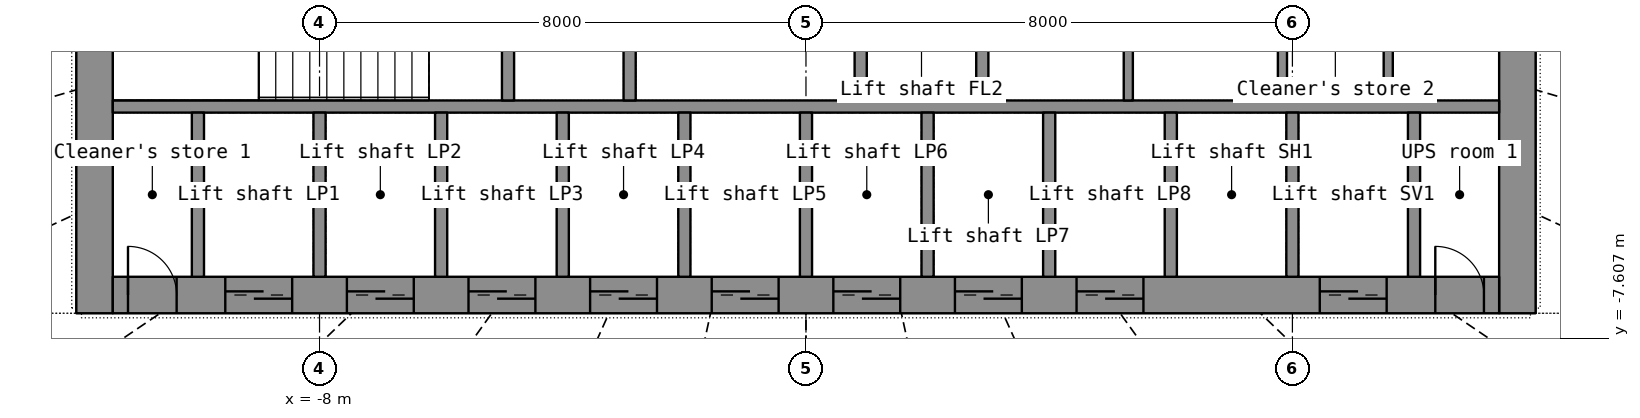
"""IFC4 building model, lengths in metres.
Left out: names, types, materials, properties, quantities, classifications, styles, units other than length and angle.
Written with IfcOpenShell. Run it as: python <this file> out.ifc"""

import sys

from ifc_helpers import new_model, si_unit, direction, frame, frame_2d, origin, place, context, subcontext, project, spatial, rectangle, extrude, element, fill, save


model = new_model("IFC4")
c1 = context("Model", 3, precision=1e-05, world=origin(), true_north=direction((0.0, 1.0)))
c2 = subcontext(c1, "Body", "Model", "MODEL_VIEW")
j1 = project(units=[si_unit("LENGTHUNIT", "METRE"), si_unit("PLANEANGLEUNIT", "RADIAN")], contexts=[c1])
p1 = place(None, origin())
s1 = spatial("IfcSite", under=j1, at=p1, CompositionType="ELEMENT")
p2 = place(p1, origin())
s2 = spatial("IfcBuilding", under=s1, at=p2, CompositionType="ELEMENT")
p3 = place(p2, frame((0.0, 0.0, 77.8)))
s3 = spatial("IfcBuildingStorey", under=s2, at=p3, CompositionType="ELEMENT", Elevation=77.8)
p4 = place(p3, frame((-11.7, -7.2, 0.0), z_axis=(0.0, 0.0, 1.0), x_axis=(0.0, 1.0, 0.0)))
e1 = element("IfcWall", 1, at=p4, inside=s3, PredefinedType="SHEAR", context=c2, shape_type="SweptSolid", body=[
    extrude(rectangle(XDim=14.4, YDim=0.6, at=frame_2d((7.2, 0.0))), origin(), (0.0, 0.0, 1.0), 3.3),
])
p5 = place(p4, frame((6.5, 0.0, 0.0)))
e2 = element("IfcOpeningElement", 2, at=p5, cuts=e1, PredefinedType="OPENING", context=c2, shape_type="SweptSolid", body=[
    extrude(rectangle(XDim=1.4, YDim=2.2, at=frame_2d((0.7, 1.1))), frame((0.0, 0.31, 0.0), z_axis=(0.0, -1.0, 0.0), x_axis=(1.0, 0.0, 0.0)), (0.0, 0.0, 1.0), 0.62),
])
p6 = place(p3, frame((11.7, -7.2, 0.0), z_axis=(0.0, 0.0, 1.0), x_axis=(0.0, 1.0, 0.0)))
e3 = element("IfcWall", 3, at=p6, inside=s3, PredefinedType="SHEAR", context=c2, shape_type="SweptSolid", body=[
    extrude(rectangle(XDim=14.4, YDim=0.6, at=frame_2d((7.2, 0.0))), origin(), (0.0, 0.0, 1.0), 3.3),
])
p7 = place(p6, frame((6.5, 0.0, 0.0)))
e4 = element("IfcOpeningElement", 4, at=p7, cuts=e3, PredefinedType="OPENING", context=c2, shape_type="SweptSolid", body=[
    extrude(rectangle(XDim=1.4, YDim=2.2, at=frame_2d((0.7, 1.1))), frame((0.0, 0.31, 0.0), z_axis=(0.0, -1.0, 0.0), x_axis=(1.0, 0.0, 0.0)), (0.0, 0.0, 1.0), 0.62),
])
p8 = place(p3, frame((-11.4, -6.9, 0.0), z_axis=(0.0, 0.0, 1.0), x_axis=(1.0, 0.0, 0.0)))
e5 = element("IfcWall", 5, at=p8, inside=s3, PredefinedType="SHEAR", context=c2, shape_type="SweptSolid", body=[
    extrude(rectangle(XDim=22.8, YDim=0.6, at=frame_2d((11.4, 0.0))), origin(), (0.0, 0.0, 1.0), 3.3),
])
p9 = place(p8, frame((1.85, 0.0, 0.0)))
e6 = element("IfcOpeningElement", 6, at=p9, cuts=e5, PredefinedType="OPENING", context=c2, shape_type="SweptSolid", body=[
    extrude(rectangle(XDim=1.1, YDim=2.2, at=frame_2d((0.55, 1.1))), frame((0.0, 0.31, 0.0), z_axis=(0.0, -1.0, 0.0), x_axis=(1.0, 0.0, 0.0)), (0.0, 0.0, 1.0), 0.62),
])
p10 = place(p8, frame((3.85, 0.0, 0.0)))
e7 = element("IfcOpeningElement", 7, at=p10, cuts=e5, PredefinedType="OPENING", context=c2, shape_type="SweptSolid", body=[
    extrude(rectangle(XDim=1.1, YDim=2.2, at=frame_2d((0.55, 1.1))), frame((0.0, 0.31, 0.0), z_axis=(0.0, -1.0, 0.0), x_axis=(1.0, 0.0, 0.0)), (0.0, 0.0, 1.0), 0.62),
])
p11 = place(p8, frame((5.85, 0.0, 0.0)))
e8 = element("IfcOpeningElement", 8, at=p11, cuts=e5, PredefinedType="OPENING", context=c2, shape_type="SweptSolid", body=[
    extrude(rectangle(XDim=1.1, YDim=2.2, at=frame_2d((0.55, 1.1))), frame((0.0, 0.31, 0.0), z_axis=(0.0, -1.0, 0.0), x_axis=(1.0, 0.0, 0.0)), (0.0, 0.0, 1.0), 0.62),
])
p12 = place(p8, frame((7.85, 0.0, 0.0)))
e9 = element("IfcOpeningElement", 9, at=p12, cuts=e5, PredefinedType="OPENING", context=c2, shape_type="SweptSolid", body=[
    extrude(rectangle(XDim=1.1, YDim=2.2, at=frame_2d((0.55, 1.1))), frame((0.0, 0.31, 0.0), z_axis=(0.0, -1.0, 0.0), x_axis=(1.0, 0.0, 0.0)), (0.0, 0.0, 1.0), 0.62),
])
p13 = place(p8, frame((9.85, 0.0, 0.0)))
e10 = element("IfcOpeningElement", 10, at=p13, cuts=e5, PredefinedType="OPENING", context=c2, shape_type="SweptSolid", body=[
    extrude(rectangle(XDim=1.1, YDim=2.2, at=frame_2d((0.55, 1.1))), frame((0.0, 0.31, 0.0), z_axis=(0.0, -1.0, 0.0), x_axis=(1.0, 0.0, 0.0)), (0.0, 0.0, 1.0), 0.62),
])
p14 = place(p8, frame((11.85, 0.0, 0.0)))
e11 = element("IfcOpeningElement", 11, at=p14, cuts=e5, PredefinedType="OPENING", context=c2, shape_type="SweptSolid", body=[
    extrude(rectangle(XDim=1.1, YDim=2.2, at=frame_2d((0.55, 1.1))), frame((0.0, 0.31, 0.0), z_axis=(0.0, -1.0, 0.0), x_axis=(1.0, 0.0, 0.0)), (0.0, 0.0, 1.0), 0.62),
])
p15 = place(p8, frame((13.85, 0.0, 0.0)))
e12 = element("IfcOpeningElement", 12, at=p15, cuts=e5, PredefinedType="OPENING", context=c2, shape_type="SweptSolid", body=[
    extrude(rectangle(XDim=1.1, YDim=2.2, at=frame_2d((0.55, 1.1))), frame((0.0, 0.31, 0.0), z_axis=(0.0, -1.0, 0.0), x_axis=(1.0, 0.0, 0.0)), (0.0, 0.0, 1.0), 0.62),
])
p16 = place(p8, frame((15.85, 0.0, 0.0)))
e13 = element("IfcOpeningElement", 13, at=p16, cuts=e5, PredefinedType="OPENING", context=c2, shape_type="SweptSolid", body=[
    extrude(rectangle(XDim=1.1, YDim=2.2, at=frame_2d((0.55, 1.1))), frame((0.0, 0.31, 0.0), z_axis=(0.0, -1.0, 0.0), x_axis=(1.0, 0.0, 0.0)), (0.0, 0.0, 1.0), 0.62),
])
p17 = place(p8, frame((19.85, 0.0, 0.0)))
e14 = element("IfcOpeningElement", 14, at=p17, cuts=e5, PredefinedType="OPENING", context=c2, shape_type="SweptSolid", body=[
    extrude(rectangle(XDim=1.1, YDim=2.2, at=frame_2d((0.55, 1.1))), frame((0.0, 0.31, 0.0), z_axis=(0.0, -1.0, 0.0), x_axis=(1.0, 0.0, 0.0)), (0.0, 0.0, 1.0), 0.62),
])
p18 = place(p8, frame((0.25, 0.0, 0.0)))
e15 = element("IfcOpeningElement", 15, at=p18, cuts=e5, PredefinedType="OPENING", context=c2, shape_type="SweptSolid", body=[
    extrude(rectangle(XDim=0.8, YDim=2.05, at=frame_2d((0.4, 1.025))), frame((0.0, 0.31, 0.0), z_axis=(0.0, -1.0, 0.0), x_axis=(1.0, 0.0, 0.0)), (0.0, 0.0, 1.0), 0.62),
])
p19 = place(p8, frame((21.75, 0.0, 0.0)))
e16 = element("IfcOpeningElement", 16, at=p19, cuts=e5, PredefinedType="OPENING", context=c2, shape_type="SweptSolid", body=[
    extrude(rectangle(XDim=0.8, YDim=2.05, at=frame_2d((0.4, 1.025))), frame((0.0, 0.31, 0.0), z_axis=(0.0, -1.0, 0.0), x_axis=(1.0, 0.0, 0.0)), (0.0, 0.0, 1.0), 0.62),
])
p20 = place(p3, frame((-11.4, -3.8, 0.0), z_axis=(0.0, 0.0, 1.0), x_axis=(1.0, 0.0, 0.0)))
e17 = element("IfcWall", 17, at=p20, inside=s3, PredefinedType="SHEAR", context=c2, shape_type="SweptSolid", body=[
    extrude(rectangle(XDim=22.8, YDim=0.2, at=frame_2d((11.4, 0.0))), origin(), (0.0, 0.0, 1.0), 3.3),
])
for number, where, z_axis, x_axis in (
    (18, (-10.0, -6.6, 0.0), (0.0, 0.0, 1.0), (0.0, 1.0, 0.0)),
    (19, (-8.0, -6.6, 0.0), (0.0, 0.0, 1.0), (0.0, 1.0, 0.0)),
    (20, (-6.0, -6.6, 0.0), (0.0, 0.0, 1.0), (0.0, 1.0, 0.0)),
    (21, (-4.0, -6.6, 0.0), (0.0, 0.0, 1.0), (0.0, 1.0, 0.0)),
    (22, (-2.0, -6.6, 0.0), (0.0, 0.0, 1.0), (0.0, 1.0, 0.0)),
    (23, (0.0, -6.6, 0.0), (0.0, 0.0, 1.0), (0.0, 1.0, 0.0)),
    (24, (2.0, -6.6, 0.0), (0.0, 0.0, 1.0), (0.0, 1.0, 0.0)),
    (25, (4.0, -6.6, 0.0), (0.0, 0.0, 1.0), (0.0, 1.0, 0.0)),
    (26, (6.0, -6.6, 0.0), (0.0, 0.0, 1.0), (0.0, 1.0, 0.0)),
    (27, (8.0, -6.6, 0.0), (0.0, 0.0, 1.0), (0.0, 1.0, 0.0)),
    (28, (10.0, -6.6, 0.0), (0.0, 0.0, 1.0), (0.0, 1.0, 0.0)),
):
    element("IfcWall", number, at=place(p3, frame(where, z_axis=z_axis, x_axis=x_axis)), inside=s3, PredefinedType="SHEAR", context=c2, shape_type="SweptSolid", body=[
        extrude(rectangle(XDim=2.7, YDim=0.2, at=frame_2d((1.35, 0.0))), origin(), (0.0, 0.0, 1.0), 3.3),
    ])
p21 = place(p3, frame((-2.9, -3.7, 0.0), z_axis=(0.0, 0.0, 1.0), x_axis=(0.0, 1.0, 0.0)))
e29 = element("IfcWall", 29, at=p21, inside=s3, PredefinedType="SHEAR", context=c2, shape_type="SweptSolid", body=[
    extrude(rectangle(XDim=7.4, YDim=0.2, at=frame_2d((3.7, 0.0))), origin(), (0.0, 0.0, 1.0), 3.3),
])
p22 = place(p21, frame((3.1, 0.0, 0.0)))
e30 = element("IfcOpeningElement", 30, at=p22, cuts=e29, PredefinedType="OPENING", context=c2, shape_type="SweptSolid", body=[
    extrude(rectangle(XDim=1.2, YDim=2.2, at=frame_2d((0.6, 1.1))), frame((0.0, 0.11, 0.0), z_axis=(0.0, -1.0, 0.0), x_axis=(1.0, 0.0, 0.0)), (0.0, 0.0, 1.0), 0.22),
])
p23 = place(p3, frame((2.9, -3.7, 0.0), z_axis=(0.0, 0.0, 1.0), x_axis=(0.0, 1.0, 0.0)))
e31 = element("IfcWall", 31, at=p23, inside=s3, PredefinedType="SHEAR", context=c2, shape_type="SweptSolid", body=[
    extrude(rectangle(XDim=7.4, YDim=0.2, at=frame_2d((3.7, 0.0))), origin(), (0.0, 0.0, 1.0), 3.3),
])
p24 = place(p23, frame((3.1, 0.0, 0.0)))
e32 = element("IfcOpeningElement", 32, at=p24, cuts=e31, PredefinedType="OPENING", context=c2, shape_type="SweptSolid", body=[
    extrude(rectangle(XDim=1.2, YDim=2.2, at=frame_2d((0.6, 1.1))), frame((0.0, 0.11, 0.0), z_axis=(0.0, -1.0, 0.0), x_axis=(1.0, 0.0, 0.0)), (0.0, 0.0, 1.0), 0.22),
])
for number, where, z_axis, x_axis in (
    (33, (0.9, -3.7, 0.0), (0.0, 0.0, 1.0), (0.0, 1.0, 0.0)),
    (34, (-4.9, -3.7, 0.0), (0.0, 0.0, 1.0), (0.0, 1.0, 0.0)),
):
    element("IfcWall", number, at=place(p3, frame(where, z_axis=z_axis, x_axis=x_axis)), inside=s3, PredefinedType="SHEAR", context=c2, shape_type="SweptSolid", body=[
        extrude(rectangle(XDim=2.35, YDim=0.2, at=frame_2d((1.175, 0.0))), origin(), (0.0, 0.0, 1.0), 3.3),
    ])
for number, where, z_axis, x_axis in (
    (35, (5.301, -3.7, 0.0), (0.0, 0.0, 1.0), (0.0, 1.0, 0.0)),
    (36, (7.836, -3.7, 0.0), (0.0, 0.0, 1.0), (0.0, 1.0, 0.0)),
    (37, (9.576, -3.7, 0.0), (0.0, 0.0, 1.0), (0.0, 1.0, 0.0)),
):
    element("IfcWall", number, at=place(p3, frame(where, z_axis=z_axis, x_axis=x_axis)), inside=s3, PredefinedType="PARTITIONING", context=c2, shape_type="SweptSolid", body=[
        extrude(rectangle(XDim=2.35, YDim=0.15, at=frame_2d((1.175, 0.0))), origin(), (0.0, 0.0, 1.0), 3.3),
    ])
p25 = place(p9, origin())
e38 = element("IfcDoor", 38, at=p25, inside=s3, OperationType="DOUBLE_DOOR_SLIDING", PredefinedType="DOOR", context=c2, shape_type="SweptSolid", body=[
    extrude(rectangle(XDim=1.1, YDim=2.2, at=frame_2d((0.55, 1.1))), frame((0.0, 0.025, 0.0), z_axis=(0.0, -1.0, 0.0), x_axis=(1.0, 0.0, 0.0)), (0.0, 0.0, 1.0), 0.05),
])
fill(e6, e38)
p26 = place(p10, origin())
e39 = element("IfcDoor", 39, at=p26, inside=s3, OperationType="DOUBLE_DOOR_SLIDING", PredefinedType="DOOR", context=c2, shape_type="SweptSolid", body=[
    extrude(rectangle(XDim=1.1, YDim=2.2, at=frame_2d((0.55, 1.1))), frame((0.0, 0.025, 0.0), z_axis=(0.0, -1.0, 0.0), x_axis=(1.0, 0.0, 0.0)), (0.0, 0.0, 1.0), 0.05),
])
fill(e7, e39)
p27 = place(p11, origin())
e40 = element("IfcDoor", 40, at=p27, inside=s3, OperationType="DOUBLE_DOOR_SLIDING", PredefinedType="DOOR", context=c2, shape_type="SweptSolid", body=[
    extrude(rectangle(XDim=1.1, YDim=2.2, at=frame_2d((0.55, 1.1))), frame((0.0, 0.025, 0.0), z_axis=(0.0, -1.0, 0.0), x_axis=(1.0, 0.0, 0.0)), (0.0, 0.0, 1.0), 0.05),
])
fill(e8, e40)
p28 = place(p12, origin())
e41 = element("IfcDoor", 41, at=p28, inside=s3, OperationType="DOUBLE_DOOR_SLIDING", PredefinedType="DOOR", context=c2, shape_type="SweptSolid", body=[
    extrude(rectangle(XDim=1.1, YDim=2.2, at=frame_2d((0.55, 1.1))), frame((0.0, 0.025, 0.0), z_axis=(0.0, -1.0, 0.0), x_axis=(1.0, 0.0, 0.0)), (0.0, 0.0, 1.0), 0.05),
])
fill(e9, e41)
p29 = place(p13, origin())
e42 = element("IfcDoor", 42, at=p29, inside=s3, OperationType="DOUBLE_DOOR_SLIDING", PredefinedType="DOOR", context=c2, shape_type="SweptSolid", body=[
    extrude(rectangle(XDim=1.1, YDim=2.2, at=frame_2d((0.55, 1.1))), frame((0.0, 0.025, 0.0), z_axis=(0.0, -1.0, 0.0), x_axis=(1.0, 0.0, 0.0)), (0.0, 0.0, 1.0), 0.05),
])
fill(e10, e42)
p30 = place(p14, origin())
e43 = element("IfcDoor", 43, at=p30, inside=s3, OperationType="DOUBLE_DOOR_SLIDING", PredefinedType="DOOR", context=c2, shape_type="SweptSolid", body=[
    extrude(rectangle(XDim=1.1, YDim=2.2, at=frame_2d((0.55, 1.1))), frame((0.0, 0.025, 0.0), z_axis=(0.0, -1.0, 0.0), x_axis=(1.0, 0.0, 0.0)), (0.0, 0.0, 1.0), 0.05),
])
fill(e11, e43)
p31 = place(p15, origin())
e44 = element("IfcDoor", 44, at=p31, inside=s3, OperationType="DOUBLE_DOOR_SLIDING", PredefinedType="DOOR", context=c2, shape_type="SweptSolid", body=[
    extrude(rectangle(XDim=1.1, YDim=2.2, at=frame_2d((0.55, 1.1))), frame((0.0, 0.025, 0.0), z_axis=(0.0, -1.0, 0.0), x_axis=(1.0, 0.0, 0.0)), (0.0, 0.0, 1.0), 0.05),
])
fill(e12, e44)
p32 = place(p16, origin())
e45 = element("IfcDoor", 45, at=p32, inside=s3, OperationType="DOUBLE_DOOR_SLIDING", PredefinedType="DOOR", context=c2, shape_type="SweptSolid", body=[
    extrude(rectangle(XDim=1.1, YDim=2.2, at=frame_2d((0.55, 1.1))), frame((0.0, 0.025, 0.0), z_axis=(0.0, -1.0, 0.0), x_axis=(1.0, 0.0, 0.0)), (0.0, 0.0, 1.0), 0.05),
])
fill(e13, e45)
p33 = place(p17, origin())
e46 = element("IfcDoor", 46, at=p33, inside=s3, OperationType="DOUBLE_DOOR_SLIDING", PredefinedType="DOOR", context=c2, shape_type="SweptSolid", body=[
    extrude(rectangle(XDim=1.1, YDim=2.2, at=frame_2d((0.55, 1.1))), frame((0.0, 0.025, 0.0), z_axis=(0.0, -1.0, 0.0), x_axis=(1.0, 0.0, 0.0)), (0.0, 0.0, 1.0), 0.05),
])
fill(e14, e46)
p34 = place(p18, origin())
e47 = element("IfcDoor", 47, at=p34, inside=s3, OperationType="SINGLE_SWING_LEFT", PredefinedType="DOOR", context=c2, shape_type="SweptSolid", body=[
    extrude(rectangle(XDim=0.8, YDim=2.05, at=frame_2d((0.4, 1.025))), frame((0.0, 0.025, 0.0), z_axis=(0.0, -1.0, 0.0), x_axis=(1.0, 0.0, 0.0)), (0.0, 0.0, 1.0), 0.05),
])
fill(e15, e47)
p35 = place(p19, origin())
e48 = element("IfcDoor", 48, at=p35, inside=s3, OperationType="SINGLE_SWING_LEFT", PredefinedType="DOOR", context=c2, shape_type="SweptSolid", body=[
    extrude(rectangle(XDim=0.8, YDim=2.05, at=frame_2d((0.4, 1.025))), frame((0.0, 0.025, 0.0), z_axis=(0.0, -1.0, 0.0), x_axis=(1.0, 0.0, 0.0)), (0.0, 0.0, 1.0), 0.05),
])
fill(e16, e48)
save(model, sys.argv[1])
